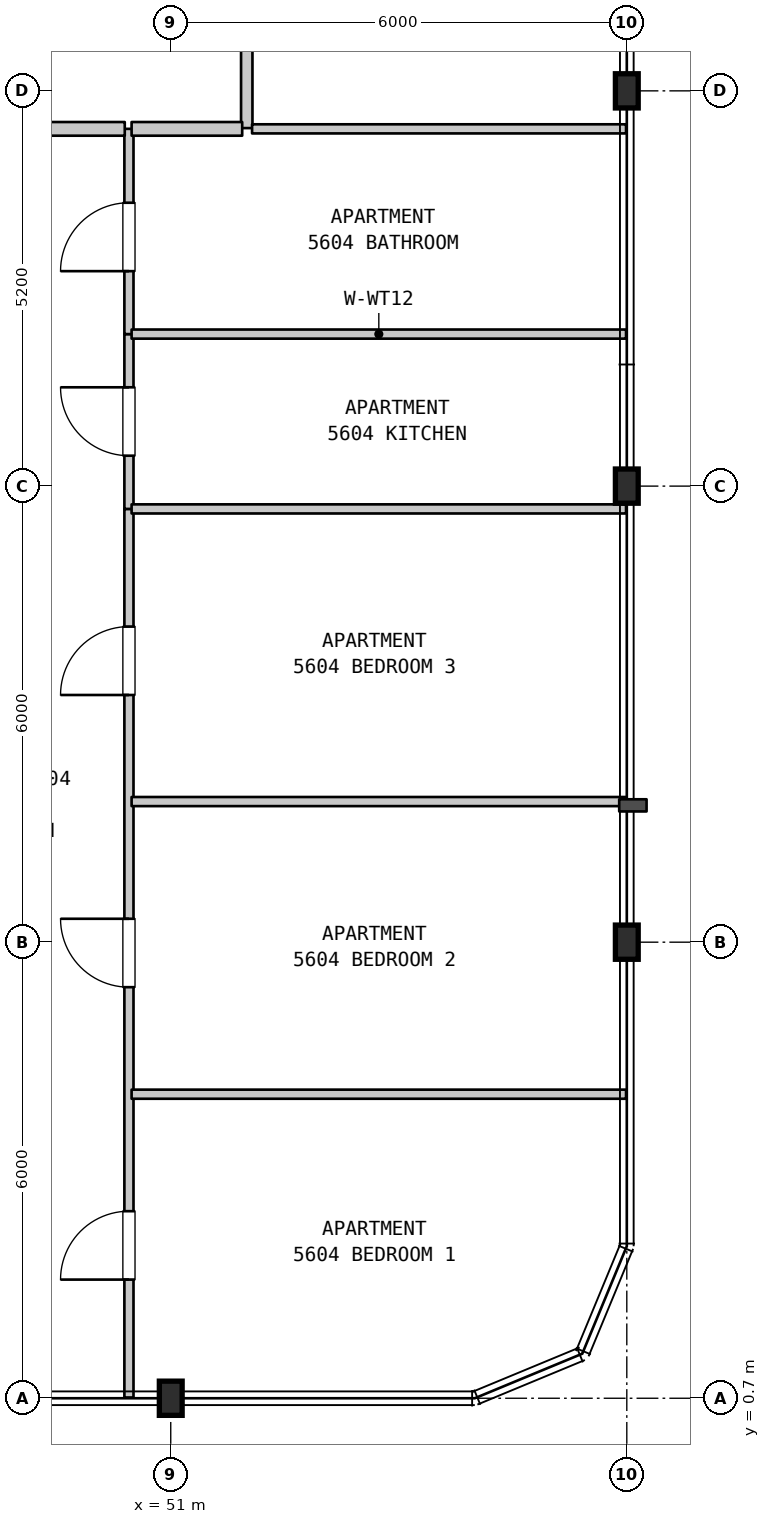
"""IFC4 building model, lengths in metres.
Left out: names, types, materials, properties, quantities, classifications, styles, units other than length and angle.
Written with IfcOpenShell. Run it as: python <this file> out.ifc"""

import sys

from ifc_helpers import new_model, si_unit, direction, frame, frame_2d, origin, origin_2d, place, context, subcontext, project, spatial, rectangle, i_section, extrude, element, fill, save


model = new_model("IFC4")
c1 = context("Model", 3, precision=1e-05, world=origin(), true_north=direction((0.0, 1.0)))
c2 = subcontext(c1, "Body", "Model", "MODEL_VIEW")
j1 = project(units=[si_unit("LENGTHUNIT", "METRE"), si_unit("PLANEANGLEUNIT", "RADIAN")], contexts=[c1])
p1 = place(None, origin())
s1 = spatial("IfcSite", under=j1, at=p1, CompositionType="ELEMENT")
p2 = place(p1, origin())
s2 = spatial("IfcBuilding", under=s1, at=p2, CompositionType="ELEMENT")
p3 = place(p2, frame((0.0, 0.0, 226.5)))
s3 = spatial("IfcBuildingStorey", under=s2, at=p3, CompositionType="ELEMENT", Elevation=226.5)
for number, where, z_axis, x_axis in (
    (1, (51.0, 0.7, 0.0), (0.0, 0.0, 1.0), (1.0, 0.0, 0.0)),
    (2, (57.0, 6.7, 0.0), (0.0, 0.0, 1.0), (1.0, 0.0, 0.0)),
    (3, (57.0, 12.7, 0.0), (0.0, 0.0, 1.0), (1.0, 0.0, 0.0)),
    (4, (57.0, 17.9, 0.0), (0.0, 0.0, 1.0), (1.0, 0.0, 0.0)),
):
    element("IfcColumn", number, at=place(p3, frame(where, z_axis=z_axis, x_axis=x_axis)), inside=s3, PredefinedType="COLUMN", context=c2, shape_type="SweptSolid", body=[
        extrude(i_section(OverallWidth=0.3, OverallDepth=0.45, WebThickness=0.014, FlangeThickness=0.026, FilletRadius=0.027, at=origin_2d()), origin(), (0.0, 0.0, 1.0), 3.7),
    ])
p4 = place(p3, frame((50.45, 0.71, 0.0), z_axis=(0.0, 0.0, 1.0), x_axis=(0.0, 1.0, 0.0)))
e5 = element("IfcWall", 5, at=p4, inside=s3, PredefinedType="PARTITIONING", context=c2, shape_type="SweptSolid", body=[
    extrude(rectangle(XDim=11.69, YDim=0.12, at=frame_2d((5.845, 0.0))), origin(), (0.0, 0.0, 1.0), 3.39),
])
p5 = place(p4, frame((1.551, 0.0, 0.0)))
e6 = element("IfcOpeningElement", 6, at=p5, cuts=e5, PredefinedType="OPENING", context=c2, shape_type="SweptSolid", body=[
    extrude(rectangle(XDim=0.9, YDim=2.15, at=frame_2d((0.45, 1.075))), frame((0.0, 0.07, 0.0), z_axis=(0.0, -1.0, 0.0), x_axis=(1.0, 0.0, 0.0)), (0.0, 0.0, 1.0), 0.14),
])
p6 = place(p4, frame((5.398, 0.0, 0.0)))
e7 = element("IfcOpeningElement", 7, at=p6, cuts=e5, PredefinedType="OPENING", context=c2, shape_type="SweptSolid", body=[
    extrude(rectangle(XDim=0.9, YDim=2.15, at=frame_2d((0.45, 1.075))), frame((0.0, 0.07, 0.0), z_axis=(0.0, -1.0, 0.0), x_axis=(1.0, 0.0, 0.0)), (0.0, 0.0, 1.0), 0.14),
])
p7 = place(p4, frame((9.242, 0.0, 0.0)))
e8 = element("IfcOpeningElement", 8, at=p7, cuts=e5, PredefinedType="OPENING", context=c2, shape_type="SweptSolid", body=[
    extrude(rectangle(XDim=0.9, YDim=2.15, at=frame_2d((0.45, 1.075))), frame((0.0, 0.07, 0.0), z_axis=(0.0, -1.0, 0.0), x_axis=(1.0, 0.0, 0.0)), (0.0, 0.0, 1.0), 0.14),
])
p8 = place(p3, frame((50.45, 12.4, 0.0), z_axis=(0.0, 0.0, 1.0), x_axis=(0.0, 1.0, 0.0)))
e9 = element("IfcWall", 9, at=p8, inside=s3, PredefinedType="PARTITIONING", context=c2, shape_type="SweptSolid", body=[
    extrude(rectangle(XDim=2.3, YDim=0.12, at=frame_2d((1.15, 0.0))), origin(), (0.0, 0.0, 1.0), 3.39),
])
p9 = place(p8, frame((0.7, 0.0, 0.0)))
e10 = element("IfcOpeningElement", 10, at=p9, cuts=e9, PredefinedType="OPENING", context=c2, shape_type="SweptSolid", body=[
    extrude(rectangle(XDim=0.9, YDim=2.15, at=frame_2d((0.45, 1.075))), frame((0.0, 0.07, 0.0), z_axis=(0.0, -1.0, 0.0), x_axis=(1.0, 0.0, 0.0)), (0.0, 0.0, 1.0), 0.14),
])
p10 = place(p3, frame((50.45, 14.7, 0.0), z_axis=(0.0, 0.0, 1.0), x_axis=(0.0, 1.0, 0.0)))
e11 = element("IfcWall", 11, at=p10, inside=s3, PredefinedType="PARTITIONING", context=c2, shape_type="SweptSolid", body=[
    extrude(rectangle(XDim=2.7, YDim=0.12, at=frame_2d((1.35, 0.0))), origin(), (0.0, 0.0, 1.0), 3.39),
])
p11 = place(p10, frame((0.828, 0.0, 0.0)))
e12 = element("IfcOpeningElement", 12, at=p11, cuts=e11, PredefinedType="OPENING", context=c2, shape_type="SweptSolid", body=[
    extrude(rectangle(XDim=0.9, YDim=2.1, at=frame_2d((0.45, 1.05))), frame((0.0, 0.07, 0.0), z_axis=(0.0, -1.0, 0.0), x_axis=(1.0, 0.0, 0.0)), (0.0, 0.0, 1.0), 0.14),
])
p12 = place(p3, frame((52.0, 17.41, 0.0), z_axis=(0.0, 0.0, 1.0), x_axis=(0.0, 1.0, 0.0)))
e13 = element("IfcWall", 13, at=p12, inside=s3, PredefinedType="STANDARD", context=c2, shape_type="SweptSolid", body=[
    extrude(rectangle(XDim=2.09, YDim=0.15, at=frame_2d((1.045, 0.0))), origin(), (0.0, 0.0, 1.0), 3.39),
])
for number, where, z_axis, x_axis in (
    (14, (50.485, 4.7, 0.0), (0.0, 0.0, 1.0), (1.0, 0.0, 0.0)),
    (15, (50.485, 8.55, 0.0), (0.0, 0.0, 1.0), (1.0, 0.0, 0.0)),
    (16, (50.485, 12.4, 0.0), (0.0, 0.0, 1.0), (1.0, 0.0, 0.0)),
    (17, (50.485, 14.7, 0.0), (0.0, 0.0, 1.0), (1.0, 0.0, 0.0)),
):
    element("IfcWall", number, at=place(p3, frame(where, z_axis=z_axis, x_axis=x_axis)), inside=s3, PredefinedType="PARTITIONING", context=c2, shape_type="SweptSolid", body=[
        extrude(rectangle(XDim=6.505, YDim=0.12, at=frame_2d((3.252, 0.0))), origin(), (0.0, 0.0, 1.0), 3.39),
    ])
p13 = place(p3, frame((46.885, 17.4, 0.0), z_axis=(0.0, 0.0, 1.0), x_axis=(1.0, 0.0, 0.0)))
e18 = element("IfcWall", 18, at=p13, inside=s3, PredefinedType="STANDARD", context=c2, shape_type="SweptSolid", body=[
    extrude(rectangle(XDim=3.51, YDim=0.18, at=frame_2d((1.755, 0.0))), origin(), (0.0, 0.0, 1.0), 3.39),
])
p14 = place(p13, frame((1.255, 0.0, 0.0)))
e19 = element("IfcOpeningElement", 19, at=p14, cuts=e18, PredefinedType="OPENING", context=c2, shape_type="SweptSolid", body=[
    extrude(rectangle(XDim=1.0, YDim=2.15, at=frame_2d((0.5, 1.075))), frame((0.0, 0.1, 0.0), z_axis=(0.0, -1.0, 0.0), x_axis=(1.0, 0.0, 0.0)), (0.0, 0.0, 1.0), 0.2),
])
p15 = place(p3, frame((50.485, 17.4, 0.0), z_axis=(0.0, 0.0, 1.0), x_axis=(1.0, 0.0, 0.0)))
e20 = element("IfcWall", 20, at=p15, inside=s3, PredefinedType="STANDARD", context=c2, shape_type="SweptSolid", body=[
    extrude(rectangle(XDim=1.455, YDim=0.18, at=frame_2d((0.728, 0.0))), origin(), (0.0, 0.0, 1.0), 3.39),
])
p16 = place(p3, frame((52.07, 17.4, 0.0), z_axis=(0.0, 0.0, 1.0), x_axis=(1.0, 0.0, 0.0)))
e21 = element("IfcWall", 21, at=p16, inside=s3, PredefinedType="PARTITIONING", context=c2, shape_type="SweptSolid", body=[
    extrude(rectangle(XDim=4.92, YDim=0.12, at=frame_2d((2.46, 0.0))), origin(), (0.0, 0.0, 1.0), 3.39),
])
p17 = place(p5, origin())
e22 = element("IfcDoor", 22, at=p17, inside=s3, OperationType="SINGLE_SWING_LEFT", PredefinedType="DOOR", context=c2, shape_type="SweptSolid", body=[
    extrude(rectangle(XDim=0.9, YDim=2.15, at=frame_2d((0.45, 1.075))), frame((0.0, 0.025, 0.0), z_axis=(0.0, -1.0, 0.0), x_axis=(1.0, 0.0, 0.0)), (0.0, 0.0, 1.0), 0.05),
])
fill(e6, e22)
p18 = place(p6, origin())
e23 = element("IfcDoor", 23, at=p18, inside=s3, OperationType="SINGLE_SWING_RIGHT", PredefinedType="DOOR", context=c2, shape_type="SweptSolid", body=[
    extrude(rectangle(XDim=0.9, YDim=2.15, at=frame_2d((0.45, 1.075))), frame((0.0, 0.025, 0.0), z_axis=(0.0, -1.0, 0.0), x_axis=(1.0, 0.0, 0.0)), (0.0, 0.0, 1.0), 0.05),
])
fill(e7, e23)
p19 = place(p7, origin())
e24 = element("IfcDoor", 24, at=p19, inside=s3, OperationType="SINGLE_SWING_LEFT", PredefinedType="DOOR", context=c2, shape_type="SweptSolid", body=[
    extrude(rectangle(XDim=0.9, YDim=2.15, at=frame_2d((0.45, 1.075))), frame((0.0, 0.025, 0.0), z_axis=(0.0, -1.0, 0.0), x_axis=(1.0, 0.0, 0.0)), (0.0, 0.0, 1.0), 0.05),
])
fill(e8, e24)
p20 = place(p9, origin())
e25 = element("IfcDoor", 25, at=p20, inside=s3, OperationType="SINGLE_SWING_RIGHT", PredefinedType="DOOR", context=c2, shape_type="SweptSolid", body=[
    extrude(rectangle(XDim=0.9, YDim=2.15, at=frame_2d((0.45, 1.075))), frame((0.0, 0.025, 0.0), z_axis=(0.0, -1.0, 0.0), x_axis=(1.0, 0.0, 0.0)), (0.0, 0.0, 1.0), 0.05),
])
fill(e10, e25)
p21 = place(p11, origin())
e26 = element("IfcDoor", 26, at=p21, inside=s3, OperationType="SINGLE_SWING_LEFT", PredefinedType="DOOR", context=c2, shape_type="SweptSolid", body=[
    extrude(rectangle(XDim=0.9, YDim=2.1, at=frame_2d((0.45, 1.05))), frame((0.0, 0.025, 0.0), z_axis=(0.0, -1.0, 0.0), x_axis=(1.0, 0.0, 0.0)), (0.0, 0.0, 1.0), 0.05),
])
fill(e12, e26)
save(model, sys.argv[1])
